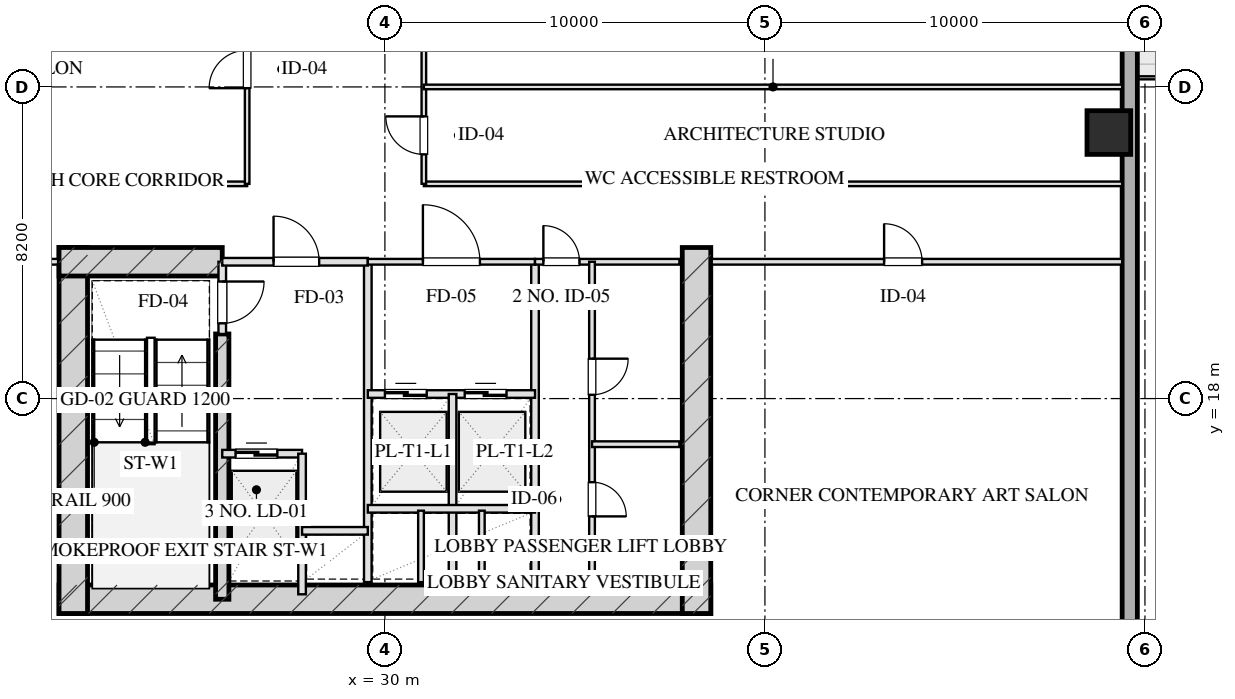
"""IFC4 building model, lengths in metres.
Left out: names, types, materials, properties, quantities, classifications, styles, units other than length and angle.
Written with IfcOpenShell. Run it as: python <this file> out.ifc"""

import sys

from ifc_helpers import new_model, si_unit, direction, frame, frame_2d, origin, origin_2d, place, context, subcontext, project, spatial, rectangle, hollow_rectangle, extrude, element, fill, save


model = new_model("IFC4")
c1 = context("Model", 3, precision=1e-05, world=origin(), true_north=direction((0.0, 1.0)))
c2 = subcontext(c1, "Body", "Model", "MODEL_VIEW")
j1 = project(units=[si_unit("LENGTHUNIT", "METRE"), si_unit("PLANEANGLEUNIT", "RADIAN")], contexts=[c1])
p1 = place(None, origin())
s1 = spatial("IfcSite", under=j1, at=p1, CompositionType="ELEMENT")
p2 = place(p1, origin())
s2 = spatial("IfcBuilding", under=s1, at=p2, CompositionType="ELEMENT")
p3 = place(p2, frame((0.0, 0.0, 60.95)))
s3 = spatial("IfcBuildingStorey", under=s2, at=p3, CompositionType="ELEMENT", Elevation=60.95)
p4 = place(p3, frame((21.425, 12.72, 0.0), z_axis=(0.0, 0.0, 1.0), x_axis=(1.0, 0.0, 0.0)))
e1 = element("IfcWall", 1, at=p4, inside=s3, PredefinedType="SHEAR", context=c2, shape_type="SweptSolid", body=[
    extrude(rectangle(XDim=17.15, YDim=0.75, at=frame_2d((8.575, 0.0))), origin(), (0.0, 0.0, 1.0), 3.45),
])
for number, where, z_axis, x_axis in (
    (2, (21.8, 21.975, 0.0), (0.0, 0.0, 1.0), (0.0, -1.0, 0.0)),
    (3, (38.2, 21.975, 0.0), (0.0, 0.0, 1.0), (0.0, -1.0, 0.0)),
):
    element("IfcWall", number, at=place(p3, frame(where, z_axis=z_axis, x_axis=x_axis)), inside=s3, PredefinedType="SHEAR", context=c2, shape_type="SweptSolid", body=[
        extrude(rectangle(XDim=9.63, YDim=0.75, at=frame_2d((4.815, 0.0))), origin(), (0.0, 0.0, 1.0), 3.45),
    ])
p5 = place(p3, frame((25.72, 19.7, 0.0), z_axis=(0.0, 0.0, 1.0), x_axis=(0.0, -1.0, 0.0)))
e4 = element("IfcWall", 4, at=p5, inside=s3, PredefinedType="SHEAR", context=c2, shape_type="SweptSolid", body=[
    extrude(rectangle(XDim=6.98, YDim=0.35, at=frame_2d((3.49, 0.0))), origin(), (0.0, 0.0, 1.0), 3.45),
])
p6 = place(p3, frame((21.425, 21.6, 0.0), z_axis=(0.0, 0.0, 1.0), x_axis=(1.0, 0.0, 0.0)))
e5 = element("IfcWall", 5, at=p6, inside=s3, PredefinedType="SHEAR", context=c2, shape_type="SweptSolid", body=[
    extrude(rectangle(XDim=4.295, YDim=0.75, at=frame_2d((2.147, 0.0))), origin(), (0.0, 0.0, 1.0), 3.45),
])
p7 = place(p3, frame((49.05, 25.0, 0.0), z_axis=(0.0, 0.0, 1.0), x_axis=(1.0, 0.0, 0.0)))
e6 = element("IfcColumn", 6, at=p7, inside=s3, PredefinedType="COLUMN", context=c2, shape_type="SweptSolid", body=[
    extrude(hollow_rectangle(XDim=1.15, YDim=1.15, WallThickness=0.04, at=origin_2d()), origin(), (0.0, 0.0, 1.0), 3.451),
])
p8 = place(p3, frame((49.6, 60.8, 0.0), z_axis=(0.0, 0.0, 1.0), x_axis=(0.0, -1.0, 0.0)))
e7 = element("IfcWall", 7, at=p8, inside=s3, PredefinedType="SOLIDWALL", context=c2, shape_type="SweptSolid", body=[
    extrude(rectangle(XDim=53.6, YDim=0.4, at=frame_2d((26.8, 0.0))), origin(), (0.0, 0.0, 1.0), 2.61),
])
p9 = place(p8, frame((32.05, 0.0, 0.0)))
e8 = element("IfcOpeningElement", 8, at=p9, cuts=e7, PredefinedType="OPENING", context=c2, shape_type="SweptSolid", body=[
    extrude(rectangle(XDim=1.1, YDim=2.15, at=frame_2d((0.55, 1.075))), frame((0.0, 0.21, 0.0), z_axis=(0.0, -1.0, 0.0), x_axis=(1.0, 0.0, 0.0)), (0.0, 0.0, 1.0), 0.42),
])
p10 = place(p3, frame((25.72, 21.6, 0.0), z_axis=(0.0, 0.0, 1.0), x_axis=(0.0, -1.0, 0.0)))
e9 = element("IfcWall", 9, at=p10, inside=s3, PredefinedType="PARTITIONING", context=c2, shape_type="SweptSolid", body=[
    extrude(rectangle(XDim=1.9, YDim=0.2, at=frame_2d((0.95, 0.0))), origin(), (0.0, 0.0, 1.0), 3.175),
])
p11 = place(p10, frame((0.52, 0.0, 0.0)))
e10 = element("IfcOpeningElement", 10, at=p11, cuts=e9, PredefinedType="OPENING", context=c2, shape_type="SweptSolid", body=[
    extrude(rectangle(XDim=1.1, YDim=2.05, at=frame_2d((0.55, 1.025))), frame((0.0, 0.11, 0.0), z_axis=(0.0, -1.0, 0.0), x_axis=(1.0, 0.0, 0.0)), (0.0, 0.0, 1.0), 0.22),
])
p12 = place(p3, frame((29.55, 21.6, 0.0), z_axis=(0.0, 0.0, 1.0), x_axis=(0.0, -1.0, 0.0)))
e11 = element("IfcWall", 11, at=p12, inside=s3, PredefinedType="PARTITIONING", context=c2, shape_type="SweptSolid", body=[
    extrude(rectangle(XDim=8.43, YDim=0.2, at=frame_2d((4.215, 0.0))), origin(), (0.0, 0.0, 1.0), 3.175),
])
p13 = place(p3, frame((25.72, 21.6, 0.0), z_axis=(0.0, 0.0, 1.0), x_axis=(1.0, 0.0, 0.0)))
e12 = element("IfcWall", 12, at=p13, inside=s3, PredefinedType="PARTITIONING", context=c2, shape_type="SweptSolid", body=[
    extrude(rectangle(XDim=3.83, YDim=0.2, at=frame_2d((1.915, 0.0))), origin(), (0.0, 0.0, 1.0), 3.175),
])
p14 = place(p13, frame((1.35, 0.0, 0.0)))
e13 = element("IfcOpeningElement", 13, at=p14, cuts=e12, PredefinedType="OPENING", context=c2, shape_type="SweptSolid", body=[
    extrude(rectangle(XDim=1.2, YDim=2.05, at=frame_2d((0.6, 1.025))), frame((0.0, 0.11, 0.0), z_axis=(0.0, -1.0, 0.0), x_axis=(1.0, 0.0, 0.0)), (0.0, 0.0, 1.0), 0.22),
])
p15 = place(p3, frame((25.72, 16.55, 0.0), z_axis=(0.0, 0.0, 1.0), x_axis=(1.0, 0.0, 0.0)))
e14 = element("IfcWall", 14, at=p15, inside=s3, PredefinedType="PARTITIONING", context=c2, shape_type="SweptSolid", body=[
    extrude(rectangle(XDim=2.1, YDim=0.2, at=frame_2d((1.05, 0.0))), origin(), (0.0, 0.0, 1.0), 3.175),
])
p16 = place(p15, frame((0.35, 0.0, 0.0)))
e15 = element("IfcOpeningElement", 15, at=p16, cuts=e14, PredefinedType="OPENING", context=c2, shape_type="SweptSolid", body=[
    extrude(rectangle(XDim=1.1, YDim=2.05, at=frame_2d((0.55, 1.025))), frame((0.0, 0.11, 0.0), z_axis=(0.0, -1.0, 0.0), x_axis=(1.0, 0.0, 0.0)), (0.0, 0.0, 1.0), 0.22),
])
p17 = place(p3, frame((27.82, 16.55, 0.0), z_axis=(0.0, 0.0, 1.0), x_axis=(0.0, -1.0, 0.0)))
e16 = element("IfcWall", 16, at=p17, inside=s3, PredefinedType="PARTITIONING", context=c2, shape_type="SweptSolid", body=[
    extrude(rectangle(XDim=3.7, YDim=0.2, at=frame_2d((1.85, 0.0))), origin(), (0.0, 0.0, 1.0), 3.175),
])
p18 = place(p3, frame((27.82, 14.52, 0.0), z_axis=(0.0, 0.0, 1.0), x_axis=(1.0, 0.0, 0.0)))
e17 = element("IfcWall", 17, at=p18, inside=s3, PredefinedType="PARTITIONING", context=c2, shape_type="SweptSolid", body=[
    extrude(rectangle(XDim=1.73, YDim=0.2, at=frame_2d((0.865, 0.0))), origin(), (0.0, 0.0, 1.0), 3.175),
])
p19 = place(p3, frame((33.95, 21.6, 0.0), z_axis=(0.0, 0.0, 1.0), x_axis=(0.0, -1.0, 0.0)))
e18 = element("IfcWall", 18, at=p19, inside=s3, PredefinedType="PARTITIONING", context=c2, shape_type="SweptSolid", body=[
    extrude(rectangle(XDim=8.43, YDim=0.2, at=frame_2d((4.215, 0.0))), origin(), (0.0, 0.0, 1.0), 3.175),
])
p20 = place(p3, frame((29.55, 21.6, 0.0), z_axis=(0.0, 0.0, 1.0), x_axis=(1.0, 0.0, 0.0)))
e19 = element("IfcWall", 19, at=p20, inside=s3, PredefinedType="PARTITIONING", context=c2, shape_type="SweptSolid", body=[
    extrude(rectangle(XDim=4.4, YDim=0.15, at=frame_2d((2.2, 0.0))), origin(), (0.0, 0.0, 1.0), 3.175),
])
p21 = place(p20, frame((1.45, 0.0, 0.0)))
e20 = element("IfcOpeningElement", 20, at=p21, cuts=e19, PredefinedType="OPENING", context=c2, shape_type="SweptSolid", body=[
    extrude(rectangle(XDim=1.5, YDim=2.05, at=frame_2d((0.75, 1.025))), frame((0.0, 0.085, 0.0), z_axis=(0.0, -1.0, 0.0), x_axis=(1.0, 0.0, 0.0)), (0.0, 0.0, 1.0), 0.17),
])
p22 = place(p3, frame((29.55, 18.12, 0.0), z_axis=(0.0, 0.0, 1.0), x_axis=(1.0, 0.0, 0.0)))
e21 = element("IfcWall", 21, at=p22, inside=s3, PredefinedType="PARTITIONING", context=c2, shape_type="SweptSolid", body=[
    extrude(rectangle(XDim=4.4, YDim=0.2, at=frame_2d((2.2, 0.0))), origin(), (0.0, 0.0, 1.0), 3.175),
])
p23 = place(p22, frame((0.45, 0.0, 0.0)))
e22 = element("IfcOpeningElement", 22, at=p23, cuts=e21, PredefinedType="OPENING", context=c2, shape_type="SweptSolid", body=[
    extrude(rectangle(XDim=1.1, YDim=2.05, at=frame_2d((0.55, 1.025))), frame((0.0, 0.11, 0.0), z_axis=(0.0, -1.0, 0.0), x_axis=(1.0, 0.0, 0.0)), (0.0, 0.0, 1.0), 0.22),
])
p24 = place(p22, frame((2.55, 0.0, 0.0)))
e23 = element("IfcOpeningElement", 23, at=p24, cuts=e21, PredefinedType="OPENING", context=c2, shape_type="SweptSolid", body=[
    extrude(rectangle(XDim=1.1, YDim=2.05, at=frame_2d((0.55, 1.025))), frame((0.0, 0.11, 0.0), z_axis=(0.0, -1.0, 0.0), x_axis=(1.0, 0.0, 0.0)), (0.0, 0.0, 1.0), 0.22),
])
p25 = place(p3, frame((31.78, 18.12, 0.0), z_axis=(0.0, 0.0, 1.0), x_axis=(0.0, -1.0, 0.0)))
e24 = element("IfcWall", 24, at=p25, inside=s3, PredefinedType="PARTITIONING", context=c2, shape_type="SweptSolid", body=[
    extrude(rectangle(XDim=4.95, YDim=0.2, at=frame_2d((2.475, 0.0))), origin(), (0.0, 0.0, 1.0), 3.175),
])
p26 = place(p3, frame((29.55, 15.1, 0.0), z_axis=(0.0, 0.0, 1.0), x_axis=(1.0, 0.0, 0.0)))
e25 = element("IfcWall", 25, at=p26, inside=s3, PredefinedType="PARTITIONING", context=c2, shape_type="SweptSolid", body=[
    extrude(rectangle(XDim=4.4, YDim=0.2, at=frame_2d((2.2, 0.0))), origin(), (0.0, 0.0, 1.0), 3.175),
])
for number, where, z_axis, x_axis in (
    (26, (30.95, 15.05, 0.0), (0.0, 0.0, 1.0), (0.0, -1.0, 0.0)),
    (27, (32.55, 15.05, 0.0), (0.0, 0.0, 1.0), (0.0, -1.0, 0.0)),
):
    element("IfcWall", number, at=place(p3, frame(where, z_axis=z_axis, x_axis=x_axis)), inside=s3, PredefinedType="PARTITIONING", context=c2, shape_type="SweptSolid", body=[
        extrude(rectangle(XDim=1.88, YDim=0.15, at=frame_2d((0.94, 0.0))), origin(), (0.0, 0.0, 1.0), 3.175),
    ])
p27 = place(p3, frame((33.95, 21.6, 0.0), z_axis=(0.0, 0.0, 1.0), x_axis=(1.0, 0.0, 0.0)))
e28 = element("IfcWall", 28, at=p27, inside=s3, PredefinedType="PARTITIONING", context=c2, shape_type="SweptSolid", body=[
    extrude(rectangle(XDim=3.8, YDim=0.15, at=frame_2d((1.9, 0.0))), origin(), (0.0, 0.0, 1.0), 3.175),
])
p28 = place(p27, frame((0.22, 0.0, 0.0)))
e29 = element("IfcOpeningElement", 29, at=p28, cuts=e28, PredefinedType="OPENING", context=c2, shape_type="SweptSolid", body=[
    extrude(rectangle(XDim=0.95, YDim=2.05, at=frame_2d((0.475, 1.025))), frame((0.0, 0.085, 0.0), z_axis=(0.0, -1.0, 0.0), x_axis=(1.0, 0.0, 0.0)), (0.0, 0.0, 1.0), 0.17),
])
p29 = place(p3, frame((35.45, 21.6, 0.0), z_axis=(0.0, 0.0, 1.0), x_axis=(0.0, -1.0, 0.0)))
e30 = element("IfcWall", 30, at=p29, inside=s3, PredefinedType="PARTITIONING", context=c2, shape_type="SweptSolid", body=[
    extrude(rectangle(XDim=8.43, YDim=0.15, at=frame_2d((4.215, 0.0))), origin(), (0.0, 0.0, 1.0), 2.765),
])
p30 = place(p29, frame((2.55, 0.0, 0.0)))
e31 = element("IfcOpeningElement", 31, at=p30, cuts=e30, PredefinedType="OPENING", context=c2, shape_type="SweptSolid", body=[
    extrude(rectangle(XDim=0.95, YDim=2.05, at=frame_2d((0.475, 1.025))), frame((0.0, 0.085, 0.0), z_axis=(0.0, -1.0, 0.0), x_axis=(1.0, 0.0, 0.0)), (0.0, 0.0, 1.0), 0.17),
])
p31 = place(p29, frame((5.8, 0.0, 0.0)))
e32 = element("IfcOpeningElement", 32, at=p31, cuts=e30, PredefinedType="OPENING", context=c2, shape_type="SweptSolid", body=[
    extrude(rectangle(XDim=0.9, YDim=2.05, at=frame_2d((0.45, 1.025))), frame((0.0, 0.085, 0.0), z_axis=(0.0, -1.0, 0.0), x_axis=(1.0, 0.0, 0.0)), (0.0, 0.0, 1.0), 0.17),
])
p32 = place(p3, frame((35.45, 16.8, 0.0), z_axis=(0.0, 0.0, 1.0), x_axis=(1.0, 0.0, 0.0)))
e33 = element("IfcWall", 33, at=p32, inside=s3, PredefinedType="PARTITIONING", context=c2, shape_type="SweptSolid", body=[
    extrude(rectangle(XDim=2.3, YDim=0.15, at=frame_2d((1.15, 0.0))), origin(), (0.0, 0.0, 1.0), 3.175),
])
p33 = place(p3, frame((10.6, 21.6, 0.0), z_axis=(0.0, 0.0, 1.0), x_axis=(1.0, 0.0, 0.0)))
e34 = element("IfcWall", 34, at=p33, inside=s3, PredefinedType="PARTITIONING", context=c2, shape_type="SweptSolid", body=[
    extrude(rectangle(XDim=10.8, YDim=0.15, at=frame_2d((5.4, 0.0))), origin(), (0.0, 0.0, 1.0), 3.175),
])
p34 = place(p33, frame((4.536, 0.0, 0.0)))
e35 = element("IfcOpeningElement", 35, at=p34, cuts=e34, PredefinedType="OPENING", context=c2, shape_type="SweptSolid", body=[
    extrude(rectangle(XDim=1.0, YDim=2.05, at=frame_2d((0.5, 1.025))), frame((0.0, 0.085, 0.0), z_axis=(0.0, -1.0, 0.0), x_axis=(1.0, 0.0, 0.0)), (0.0, 0.0, 1.0), 0.17),
])
p35 = place(p3, frame((38.6, 21.6, 0.0), z_axis=(0.0, 0.0, 1.0), x_axis=(1.0, 0.0, 0.0)))
e36 = element("IfcWall", 36, at=p35, inside=s3, PredefinedType="PARTITIONING", context=c2, shape_type="SweptSolid", body=[
    extrude(rectangle(XDim=10.8, YDim=0.15, at=frame_2d((5.4, 0.0))), origin(), (0.0, 0.0, 1.0), 3.175),
])
p36 = place(p35, frame((4.536, 0.0, 0.0)))
e37 = element("IfcOpeningElement", 37, at=p36, cuts=e36, PredefinedType="OPENING", context=c2, shape_type="SweptSolid", body=[
    extrude(rectangle(XDim=1.0, YDim=2.05, at=frame_2d((0.5, 1.025))), frame((0.0, 0.085, 0.0), z_axis=(0.0, -1.0, 0.0), x_axis=(1.0, 0.0, 0.0)), (0.0, 0.0, 1.0), 0.17),
])
p37 = place(p3, frame((10.6, 23.65, 0.0), z_axis=(0.0, 0.0, 1.0), x_axis=(1.0, 0.0, 0.0)))
e38 = element("IfcWall", 38, at=p37, inside=s3, PredefinedType="PARTITIONING", context=c2, shape_type="SweptSolid", body=[
    extrude(rectangle(XDim=15.775, YDim=0.12, at=frame_2d((7.887, 0.0))), origin(), (0.0, 0.0, 1.0), 3.175),
])
p38 = place(p3, frame((31.025, 23.65, 0.0), z_axis=(0.0, 0.0, 1.0), x_axis=(1.0, 0.0, 0.0)))
e39 = element("IfcWall", 39, at=p38, inside=s3, PredefinedType="PARTITIONING", context=c2, shape_type="SweptSolid", body=[
    extrude(rectangle(XDim=18.375, YDim=0.12, at=frame_2d((9.188, 0.0))), origin(), (0.0, 0.0, 1.0), 3.175),
])
p39 = place(p3, frame((26.375, 23.65, 0.0), z_axis=(0.0, 0.0, 1.0), x_axis=(0.0, 1.0, 0.0)))
e40 = element("IfcWall", 40, at=p39, inside=s3, PredefinedType="PARTITIONING", context=c2, shape_type="SweptSolid", body=[
    extrude(rectangle(XDim=20.7, YDim=0.12, at=frame_2d((10.35, 0.0))), origin(), (0.0, 0.0, 1.0), 3.175),
])
p40 = place(p39, frame((2.518, 0.0, 0.0)))
e41 = element("IfcOpeningElement", 41, at=p40, cuts=e40, PredefinedType="OPENING", context=c2, shape_type="SweptSolid", body=[
    extrude(rectangle(XDim=1.0, YDim=2.05, at=frame_2d((0.5, 1.025))), frame((0.0, 0.07, 0.0), z_axis=(0.0, -1.0, 0.0), x_axis=(1.0, 0.0, 0.0)), (0.0, 0.0, 1.0), 0.14),
])
p41 = place(p39, frame((9.692, 0.0, 0.0)))
e42 = element("IfcOpeningElement", 42, at=p41, cuts=e40, PredefinedType="OPENING", context=c2, shape_type="SweptSolid", body=[
    extrude(rectangle(XDim=1.0, YDim=2.05, at=frame_2d((0.5, 1.025))), frame((0.0, 0.07, 0.0), z_axis=(0.0, -1.0, 0.0), x_axis=(1.0, 0.0, 0.0)), (0.0, 0.0, 1.0), 0.14),
])
p42 = place(p39, frame((17.025, 0.0, 0.0)))
e43 = element("IfcOpeningElement", 43, at=p42, cuts=e40, PredefinedType="OPENING", context=c2, shape_type="SweptSolid", body=[
    extrude(rectangle(XDim=1.0, YDim=2.05, at=frame_2d((0.5, 1.025))), frame((0.0, 0.07, 0.0), z_axis=(0.0, -1.0, 0.0), x_axis=(1.0, 0.0, 0.0)), (0.0, 0.0, 1.0), 0.14),
])
p43 = place(p3, frame((31.025, 23.65, 0.0), z_axis=(0.0, 0.0, 1.0), x_axis=(0.0, 1.0, 0.0)))
e44 = element("IfcWall", 44, at=p43, inside=s3, PredefinedType="PARTITIONING", context=c2, shape_type="SweptSolid", body=[
    extrude(rectangle(XDim=20.7, YDim=0.12, at=frame_2d((10.35, 0.0))), origin(), (0.0, 0.0, 1.0), 3.175),
])
p44 = place(p43, frame((0.775, 0.0, 0.0)))
e45 = element("IfcOpeningElement", 45, at=p44, cuts=e44, PredefinedType="OPENING", context=c2, shape_type="SweptSolid", body=[
    extrude(rectangle(XDim=1.0, YDim=2.05, at=frame_2d((0.5, 1.025))), frame((0.0, 0.07, 0.0), z_axis=(0.0, -1.0, 0.0), x_axis=(1.0, 0.0, 0.0)), (0.0, 0.0, 1.0), 0.14),
])
p45 = place(p43, frame((3.95, 0.0, 0.0)))
e46 = element("IfcOpeningElement", 46, at=p45, cuts=e44, PredefinedType="OPENING", context=c2, shape_type="SweptSolid", body=[
    extrude(rectangle(XDim=1.0, YDim=2.05, at=frame_2d((0.5, 1.025))), frame((0.0, 0.07, 0.0), z_axis=(0.0, -1.0, 0.0), x_axis=(1.0, 0.0, 0.0)), (0.0, 0.0, 1.0), 0.14),
])
p46 = place(p43, frame((8.455, 0.0, 0.0)))
e47 = element("IfcOpeningElement", 47, at=p46, cuts=e44, PredefinedType="OPENING", context=c2, shape_type="SweptSolid", body=[
    extrude(rectangle(XDim=1.05, YDim=2.05, at=frame_2d((0.525, 1.025))), frame((0.0, 0.07, 0.0), z_axis=(0.0, -1.0, 0.0), x_axis=(1.0, 0.0, 0.0)), (0.0, 0.0, 1.0), 0.14),
])
p47 = place(p43, frame((12.923, 0.0, 0.0)))
e48 = element("IfcOpeningElement", 48, at=p47, cuts=e44, PredefinedType="OPENING", context=c2, shape_type="SweptSolid", body=[
    extrude(rectangle(XDim=0.85, YDim=2.05, at=frame_2d((0.425, 1.025))), frame((0.0, 0.07, 0.0), z_axis=(0.0, -1.0, 0.0), x_axis=(1.0, 0.0, 0.0)), (0.0, 0.0, 1.0), 0.14),
])
p48 = place(p43, frame((16.338, 0.0, 0.0)))
e49 = element("IfcOpeningElement", 49, at=p48, cuts=e44, PredefinedType="OPENING", context=c2, shape_type="SweptSolid", body=[
    extrude(rectangle(XDim=1.0, YDim=2.05, at=frame_2d((0.5, 1.025))), frame((0.0, 0.07, 0.0), z_axis=(0.0, -1.0, 0.0), x_axis=(1.0, 0.0, 0.0)), (0.0, 0.0, 1.0), 0.14),
])
p49 = place(p43, frame((19.045, 0.0, 0.0)))
e50 = element("IfcOpeningElement", 50, at=p49, cuts=e44, PredefinedType="OPENING", context=c2, shape_type="SweptSolid", body=[
    extrude(rectangle(XDim=1.0, YDim=2.05, at=frame_2d((0.5, 1.025))), frame((0.0, 0.07, 0.0), z_axis=(0.0, -1.0, 0.0), x_axis=(1.0, 0.0, 0.0)), (0.0, 0.0, 1.0), 0.14),
])
p50 = place(p3, frame((31.025, 26.2, 0.0), z_axis=(0.0, 0.0, 1.0), x_axis=(1.0, 0.0, 0.0)))
e51 = element("IfcWall", 51, at=p50, inside=s3, PredefinedType="PARTITIONING", context=c2, shape_type="SweptSolid", body=[
    extrude(rectangle(XDim=18.375, YDim=0.12, at=frame_2d((9.188, 0.0))), origin(), (0.0, 0.0, 1.0), 3.175),
])
p51 = place(p11, origin())
e52 = element("IfcDoor", 52, at=p51, inside=s3, OperationType="SINGLE_SWING_LEFT", PredefinedType="DOOR", context=c2, shape_type="SweptSolid", body=[
    extrude(rectangle(XDim=1.1, YDim=2.05, at=frame_2d((0.55, 1.025))), frame((0.0, 0.025, 0.0), z_axis=(0.0, -1.0, 0.0), x_axis=(1.0, 0.0, 0.0)), (0.0, 0.0, 1.0), 0.05),
])
fill(e10, e52)
p52 = place(p14, origin())
e53 = element("IfcDoor", 53, at=p52, inside=s3, OperationType="SINGLE_SWING_LEFT", PredefinedType="DOOR", context=c2, shape_type="SweptSolid", body=[
    extrude(rectangle(XDim=1.2, YDim=2.05, at=frame_2d((0.6, 1.025))), frame((0.0, 0.025, 0.0), z_axis=(0.0, -1.0, 0.0), x_axis=(1.0, 0.0, 0.0)), (0.0, 0.0, 1.0), 0.05),
])
fill(e13, e53)
p53 = place(p16, origin())
e54 = element("IfcDoor", 54, at=p53, inside=s3, OperationType="DOUBLE_DOOR_SLIDING", PredefinedType="DOOR", context=c2, shape_type="SweptSolid", body=[
    extrude(rectangle(XDim=1.1, YDim=2.05, at=frame_2d((0.55, 1.025))), frame((0.0, 0.025, 0.0), z_axis=(0.0, -1.0, 0.0), x_axis=(1.0, 0.0, 0.0)), (0.0, 0.0, 1.0), 0.05),
])
fill(e15, e54)
p54 = place(p21, origin())
e55 = element("IfcDoor", 55, at=p54, inside=s3, OperationType="SINGLE_SWING_LEFT", PredefinedType="DOOR", context=c2, shape_type="SweptSolid", body=[
    extrude(rectangle(XDim=1.5, YDim=2.05, at=frame_2d((0.75, 1.025))), frame((0.0, 0.025, 0.0), z_axis=(0.0, -1.0, 0.0), x_axis=(1.0, 0.0, 0.0)), (0.0, 0.0, 1.0), 0.05),
])
fill(e20, e55)
p55 = place(p23, origin())
e56 = element("IfcDoor", 56, at=p55, inside=s3, OperationType="DOUBLE_DOOR_SLIDING", PredefinedType="DOOR", context=c2, shape_type="SweptSolid", body=[
    extrude(rectangle(XDim=1.1, YDim=2.05, at=frame_2d((0.55, 1.025))), frame((0.0, 0.025, 0.0), z_axis=(0.0, -1.0, 0.0), x_axis=(1.0, 0.0, 0.0)), (0.0, 0.0, 1.0), 0.05),
])
fill(e22, e56)
p56 = place(p24, origin())
e57 = element("IfcDoor", 57, at=p56, inside=s3, OperationType="DOUBLE_DOOR_SLIDING", PredefinedType="DOOR", context=c2, shape_type="SweptSolid", body=[
    extrude(rectangle(XDim=1.1, YDim=2.05, at=frame_2d((0.55, 1.025))), frame((0.0, 0.025, 0.0), z_axis=(0.0, -1.0, 0.0), x_axis=(1.0, 0.0, 0.0)), (0.0, 0.0, 1.0), 0.05),
])
fill(e23, e57)
p57 = place(p28, origin())
e58 = element("IfcDoor", 58, at=p57, inside=s3, OperationType="SINGLE_SWING_LEFT", PredefinedType="DOOR", context=c2, shape_type="SweptSolid", body=[
    extrude(rectangle(XDim=0.95, YDim=2.05, at=frame_2d((0.475, 1.025))), frame((0.0, 0.025, 0.0), z_axis=(0.0, -1.0, 0.0), x_axis=(1.0, 0.0, 0.0)), (0.0, 0.0, 1.0), 0.05),
])
fill(e29, e58)
p58 = place(p30, origin())
e59 = element("IfcDoor", 59, at=p58, inside=s3, OperationType="SINGLE_SWING_LEFT", PredefinedType="DOOR", context=c2, shape_type="SweptSolid", body=[
    extrude(rectangle(XDim=0.95, YDim=2.05, at=frame_2d((0.475, 1.025))), frame((0.0, 0.025, 0.0), z_axis=(0.0, -1.0, 0.0), x_axis=(1.0, 0.0, 0.0)), (0.0, 0.0, 1.0), 0.05),
])
fill(e31, e59)
p59 = place(p31, origin())
e60 = element("IfcDoor", 60, at=p59, inside=s3, OperationType="SINGLE_SWING_RIGHT", PredefinedType="DOOR", context=c2, shape_type="SweptSolid", body=[
    extrude(rectangle(XDim=0.9, YDim=2.05, at=frame_2d((0.45, 1.025))), frame((0.0, 0.025, 0.0), z_axis=(0.0, -1.0, 0.0), x_axis=(1.0, 0.0, 0.0)), (0.0, 0.0, 1.0), 0.05),
])
fill(e32, e60)
p60 = place(p36, origin())
e61 = element("IfcDoor", 61, at=p60, inside=s3, OperationType="SINGLE_SWING_LEFT", PredefinedType="DOOR", context=c2, shape_type="SweptSolid", body=[
    extrude(rectangle(XDim=1.0, YDim=2.05, at=frame_2d((0.5, 1.025))), frame((0.0, 0.025, 0.0), z_axis=(0.0, -1.0, 0.0), x_axis=(1.0, 0.0, 0.0)), (0.0, 0.0, 1.0), 0.05),
])
fill(e37, e61)
p61 = place(p40, origin())
e62 = element("IfcDoor", 62, at=p61, inside=s3, OperationType="SINGLE_SWING_LEFT", PredefinedType="DOOR", context=c2, shape_type="SweptSolid", body=[
    extrude(rectangle(XDim=1.0, YDim=2.05, at=frame_2d((0.5, 1.025))), frame((0.0, 0.025, 0.0), z_axis=(0.0, -1.0, 0.0), x_axis=(1.0, 0.0, 0.0)), (0.0, 0.0, 1.0), 0.05),
])
fill(e41, e62)
p62 = place(p44, origin())
e63 = element("IfcDoor", 63, at=p62, inside=s3, OperationType="SINGLE_SWING_RIGHT", PredefinedType="DOOR", context=c2, shape_type="SweptSolid", body=[
    extrude(rectangle(XDim=1.0, YDim=2.05, at=frame_2d((0.5, 1.025))), frame((0.0, 0.025, 0.0), z_axis=(0.0, -1.0, 0.0), x_axis=(1.0, 0.0, 0.0)), (0.0, 0.0, 1.0), 0.05),
])
fill(e45, e63)
save(model, sys.argv[1])
